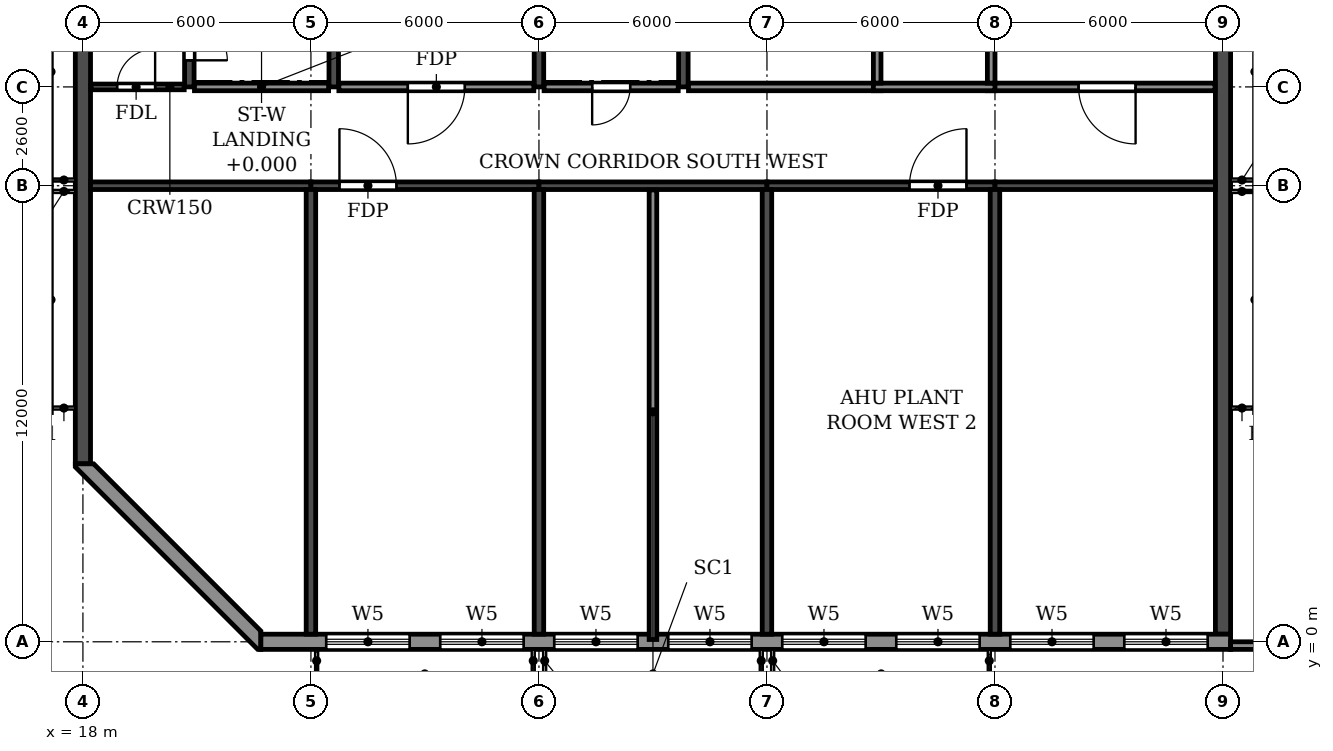
"""IFC4 building model, lengths in metres.
Left out: names, types, materials, properties, quantities, classifications, styles, units other than length and angle.
Written with IfcOpenShell. Run it as: python <this file> out.ifc"""

import sys

from ifc_helpers import new_model, si_unit, direction, frame, frame_2d, origin, place, context, subcontext, project, spatial, polyline, rectangle, outline, extrude, element, fill, save


model = new_model("IFC4")
c1 = context("Model", 3, precision=1e-05, world=origin(), true_north=direction((0.0, 1.0)))
c2 = subcontext(c1, "Body", "Model", "MODEL_VIEW")
j1 = project(units=[si_unit("LENGTHUNIT", "METRE"), si_unit("PLANEANGLEUNIT", "RADIAN")], contexts=[c1])
p1 = place(None, origin())
s1 = spatial("IfcSite", under=j1, at=p1, CompositionType="ELEMENT")
p2 = place(p1, origin())
s2 = spatial("IfcBuilding", under=s1, at=p2, CompositionType="ELEMENT")
p3 = place(p2, frame((0.0, 0.0, 272.4)))
s3 = spatial("IfcBuildingStorey", under=s2, at=p3, CompositionType="ELEMENT", Elevation=272.4)
for number, where, z_axis, x_axis in (
    (1, (24.0, 0.2, 0.0), (0.0, 0.0, 1.0), (0.0, 1.0, 0.0)),
    (2, (30.0, 0.2, 0.0), (0.0, 0.0, 1.0), (0.0, 1.0, 0.0)),
    (3, (36.0, 0.2, 0.0), (0.0, 0.0, 1.0), (0.0, 1.0, 0.0)),
    (4, (42.0, 0.2, 0.0), (0.0, 0.0, 1.0), (0.0, 1.0, 0.0)),
):
    element("IfcWall", number, at=place(p3, frame(where, z_axis=z_axis, x_axis=x_axis)), inside=s3, PredefinedType="SHEAR", context=c2, shape_type="SweptSolid", body=[
        extrude(rectangle(XDim=11.7, YDim=0.25, at=frame_2d((5.85, 0.0))), origin(), (0.0, 0.0, 1.0), 3.05),
    ])
p4 = place(p3, frame((18.0, 4.683, 0.0), z_axis=(0.0, 0.0, 1.0), x_axis=(0.0, 1.0, 0.0)))
e5 = element("IfcWall", 5, at=p4, inside=s3, PredefinedType="SHEAR", context=c2, shape_type="SweptSolid", body=[
    extrude(rectangle(XDim=31.834, YDim=0.4, at=frame_2d((15.917, 0.0))), origin(), (0.0, 0.0, 1.0), 3.05),
])
p5 = place(p3, frame((48.0, 0.2, 0.0), z_axis=(0.0, 0.0, 1.0), x_axis=(0.0, 1.0, 0.0)))
e6 = element("IfcWall", 6, at=p5, inside=s3, PredefinedType="SHEAR", context=c2, shape_type="SweptSolid", body=[
    extrude(rectangle(XDim=40.8, YDim=0.4, at=frame_2d((20.4, 0.0))), origin(), (0.0, 0.0, 1.0), 3.05),
])
p6 = place(p3, frame((18.2, 12.0, 0.0), z_axis=(0.0, 0.0, 1.0), x_axis=(1.0, 0.0, 0.0)))
e7 = element("IfcWall", 7, at=p6, inside=s3, PredefinedType="SHEAR", context=c2, shape_type="SweptSolid", body=[
    extrude(rectangle(XDim=5.8, YDim=0.2, at=frame_2d((2.9, 0.0))), origin(), (0.0, 0.0, 1.0), 2.45),
])
p7 = place(p3, frame((24.0, 12.0, 0.0), z_axis=(0.0, 0.0, 1.0), x_axis=(1.0, 0.0, 0.0)))
e8 = element("IfcWall", 8, at=p7, inside=s3, PredefinedType="SHEAR", context=c2, shape_type="SweptSolid", body=[
    extrude(rectangle(XDim=6.0, YDim=0.2, at=frame_2d((3.0, 0.0))), origin(), (0.0, 0.0, 1.0), 2.45),
])
p8 = place(p7, frame((0.75, 0.0, 0.0)))
e9 = element("IfcOpeningElement", 9, at=p8, cuts=e8, PredefinedType="OPENING", context=c2, shape_type="SweptSolid", body=[
    extrude(rectangle(XDim=1.5, YDim=2.1, at=frame_2d((0.75, 1.05))), frame((0.0, 0.11, 0.0), z_axis=(0.0, -1.0, 0.0), x_axis=(1.0, 0.0, 0.0)), (0.0, 0.0, 1.0), 0.22),
])
p9 = place(p3, frame((30.0, 12.0, 0.0), z_axis=(0.0, 0.0, 1.0), x_axis=(1.0, 0.0, 0.0)))
e10 = element("IfcWall", 10, at=p9, inside=s3, PredefinedType="SHEAR", context=c2, shape_type="SweptSolid", body=[
    extrude(rectangle(XDim=6.0, YDim=0.2, at=frame_2d((3.0, 0.0))), origin(), (0.0, 0.0, 1.0), 2.45),
])
p10 = place(p3, frame((36.0, 12.0, 0.0), z_axis=(0.0, 0.0, 1.0), x_axis=(1.0, 0.0, 0.0)))
e11 = element("IfcWall", 11, at=p10, inside=s3, PredefinedType="SHEAR", context=c2, shape_type="SweptSolid", body=[
    extrude(rectangle(XDim=6.0, YDim=0.2, at=frame_2d((3.0, 0.0))), origin(), (0.0, 0.0, 1.0), 2.45),
])
p11 = place(p10, frame((3.75, 0.0, 0.0)))
e12 = element("IfcOpeningElement", 12, at=p11, cuts=e11, PredefinedType="OPENING", context=c2, shape_type="SweptSolid", body=[
    extrude(rectangle(XDim=1.5, YDim=2.1, at=frame_2d((0.75, 1.05))), frame((0.0, 0.11, 0.0), z_axis=(0.0, -1.0, 0.0), x_axis=(1.0, 0.0, 0.0)), (0.0, 0.0, 1.0), 0.22),
])
p12 = place(p3, frame((42.0, 12.0, 0.0), z_axis=(0.0, 0.0, 1.0), x_axis=(1.0, 0.0, 0.0)))
e13 = element("IfcWall", 13, at=p12, inside=s3, PredefinedType="SHEAR", context=c2, shape_type="SweptSolid", body=[
    extrude(rectangle(XDim=5.8, YDim=0.2, at=frame_2d((2.9, 0.0))), origin(), (0.0, 0.0, 1.0), 2.45),
])
p13 = place(p3, frame((20.8, 14.6, 0.0), z_axis=(0.0, 0.0, 1.0), x_axis=(0.0, 1.0, 0.0)))
e14 = element("IfcWall", 14, at=p13, inside=s3, PredefinedType="SOLIDWALL", context=c2, shape_type="SweptSolid", body=[
    extrude(rectangle(XDim=7.875, YDim=0.25, at=frame_2d((3.938, 0.0))), origin(), (0.0, 0.0, 1.0), 3.05),
])
p14 = place(p13, frame((0.7, 0.0, 0.0)))
e15 = element("IfcOpeningElement", 15, at=p14, cuts=e14, PredefinedType="OPENING", context=c2, shape_type="SweptSolid", body=[
    extrude(rectangle(XDim=1.0, YDim=2.1, at=frame_2d((0.5, 1.05))), frame((0.0, 0.135, 0.0), z_axis=(0.0, -1.0, 0.0), x_axis=(1.0, 0.0, 0.0)), (0.0, 0.0, 1.0), 0.27),
])
for number, where, z_axis, x_axis in (
    (16, (24.6, 14.6, 0.0), (0.0, 0.0, 1.0), (0.0, 1.0, 0.0)),
    (17, (30.0, 14.6, 0.0), (0.0, 0.0, 1.0), (0.0, 1.0, 0.0)),
    (18, (33.8, 14.6, 0.0), (0.0, 0.0, 1.0), (0.0, 1.0, 0.0)),
):
    element("IfcWall", number, at=place(p3, frame(where, z_axis=z_axis, x_axis=x_axis)), inside=s3, PredefinedType="SOLIDWALL", context=c2, shape_type="SweptSolid", body=[
        extrude(rectangle(XDim=7.875, YDim=0.25, at=frame_2d((3.938, 0.0))), origin(), (0.0, 0.0, 1.0), 3.05),
    ])
p15 = place(p3, frame((22.683, 0.0, 0.0), z_axis=(0.0, 0.0, 1.0), x_axis=(1.0, 0.0, 0.0)))
e19 = element("IfcWall", 19, at=p15, inside=s3, PredefinedType="STANDARD", context=c2, shape_type="SweptSolid", body=[
    extrude(rectangle(XDim=25.517, YDim=0.4, at=frame_2d((12.759, 0.0))), origin(), (0.0, 0.0, 1.0), 3.05),
])
p16 = place(p15, frame((1.717, 0.0, 0.6)))
e20 = element("IfcOpeningElement", 20, at=p16, cuts=e19, PredefinedType="OPENING", context=c2, shape_type="SweptSolid", body=[
    extrude(rectangle(XDim=2.2, YDim=2.4, at=frame_2d((1.1, 1.2))), frame((0.0, 0.21, 0.0), z_axis=(0.0, -1.0, 0.0), x_axis=(1.0, 0.0, 0.0)), (0.0, 0.0, 1.0), 0.42),
])
p17 = place(p15, frame((4.717, 0.0, 0.6)))
e21 = element("IfcOpeningElement", 21, at=p17, cuts=e19, PredefinedType="OPENING", context=c2, shape_type="SweptSolid", body=[
    extrude(rectangle(XDim=2.2, YDim=2.4, at=frame_2d((1.1, 1.2))), frame((0.0, 0.21, 0.0), z_axis=(0.0, -1.0, 0.0), x_axis=(1.0, 0.0, 0.0)), (0.0, 0.0, 1.0), 0.42),
])
p18 = place(p15, frame((7.717, 0.0, 0.6)))
e22 = element("IfcOpeningElement", 22, at=p18, cuts=e19, PredefinedType="OPENING", context=c2, shape_type="SweptSolid", body=[
    extrude(rectangle(XDim=2.2, YDim=2.4, at=frame_2d((1.1, 1.2))), frame((0.0, 0.21, 0.0), z_axis=(0.0, -1.0, 0.0), x_axis=(1.0, 0.0, 0.0)), (0.0, 0.0, 1.0), 0.42),
])
p19 = place(p15, frame((10.717, 0.0, 0.6)))
e23 = element("IfcOpeningElement", 23, at=p19, cuts=e19, PredefinedType="OPENING", context=c2, shape_type="SweptSolid", body=[
    extrude(rectangle(XDim=2.2, YDim=2.4, at=frame_2d((1.1, 1.2))), frame((0.0, 0.21, 0.0), z_axis=(0.0, -1.0, 0.0), x_axis=(1.0, 0.0, 0.0)), (0.0, 0.0, 1.0), 0.42),
])
p20 = place(p15, frame((13.717, 0.0, 0.6)))
e24 = element("IfcOpeningElement", 24, at=p20, cuts=e19, PredefinedType="OPENING", context=c2, shape_type="SweptSolid", body=[
    extrude(rectangle(XDim=2.2, YDim=2.4, at=frame_2d((1.1, 1.2))), frame((0.0, 0.21, 0.0), z_axis=(0.0, -1.0, 0.0), x_axis=(1.0, 0.0, 0.0)), (0.0, 0.0, 1.0), 0.42),
])
p21 = place(p15, frame((16.717, 0.0, 0.6)))
e25 = element("IfcOpeningElement", 25, at=p21, cuts=e19, PredefinedType="OPENING", context=c2, shape_type="SweptSolid", body=[
    extrude(rectangle(XDim=2.2, YDim=2.4, at=frame_2d((1.1, 1.2))), frame((0.0, 0.21, 0.0), z_axis=(0.0, -1.0, 0.0), x_axis=(1.0, 0.0, 0.0)), (0.0, 0.0, 1.0), 0.42),
])
p22 = place(p15, frame((19.717, 0.0, 0.6)))
e26 = element("IfcOpeningElement", 26, at=p22, cuts=e19, PredefinedType="OPENING", context=c2, shape_type="SweptSolid", body=[
    extrude(rectangle(XDim=2.2, YDim=2.4, at=frame_2d((1.1, 1.2))), frame((0.0, 0.21, 0.0), z_axis=(0.0, -1.0, 0.0), x_axis=(1.0, 0.0, 0.0)), (0.0, 0.0, 1.0), 0.42),
])
p23 = place(p15, frame((22.717, 0.0, 0.6)))
e27 = element("IfcOpeningElement", 27, at=p23, cuts=e19, PredefinedType="OPENING", context=c2, shape_type="SweptSolid", body=[
    extrude(rectangle(XDim=2.2, YDim=2.4, at=frame_2d((1.1, 1.2))), frame((0.0, 0.21, 0.0), z_axis=(0.0, -1.0, 0.0), x_axis=(1.0, 0.0, 0.0)), (0.0, 0.0, 1.0), 0.42),
])
p24 = place(p3, origin())
e28 = element("IfcWall", 28, at=p24, inside=s3, PredefinedType="STANDARD", context=c2, shape_type="SweptSolid", body=[
    extrude(outline(polyline([(17.8, 4.683), (17.8, 4.6), (22.6, -0.2), (22.683, -0.2), (22.683, 0.283), (18.283, 4.683), (17.8, 4.683)])), origin(), (0.0, 0.0, 1.0), 3.05),
])
p25 = place(p3, origin())
e29 = element("IfcWall", 29, at=p25, inside=s3, PredefinedType="PARAPET", context=c2, shape_type="SweptSolid", body=[
    extrude(outline(polyline([(53.8, -0.2), (53.8, 0.0), (48.22, 0.0), (48.2, 0.0), (48.2, -0.2), (48.22, -0.2), (53.8, -0.2)])), origin(), (0.0, 0.0, 1.0), 1.1),
])
p26 = place(p3, frame((18.21, 14.6, 0.0), z_axis=(0.0, 0.0, 1.0), x_axis=(1.0, 0.0, 0.0)))
e30 = element("IfcWall", 30, at=p26, inside=s3, PredefinedType="PARTITIONING", context=c2, shape_type="SweptSolid", body=[
    extrude(rectangle(XDim=2.455, YDim=0.15, at=frame_2d((1.228, 0.0))), origin(), (0.0, 0.0, 1.0), 3.05),
])
p27 = place(p26, frame((0.69, 0.0, 0.0)))
e31 = element("IfcOpeningElement", 31, at=p27, cuts=e30, PredefinedType="OPENING", context=c2, shape_type="SweptSolid", body=[
    extrude(rectangle(XDim=1.0, YDim=2.1, at=frame_2d((0.5, 1.05))), frame((0.0, 0.085, 0.0), z_axis=(0.0, -1.0, 0.0), x_axis=(1.0, 0.0, 0.0)), (0.0, 0.0, 1.0), 0.17),
])
p28 = place(p3, frame((24.735, 14.6, 0.0), z_axis=(0.0, 0.0, 1.0), x_axis=(1.0, 0.0, 0.0)))
e32 = element("IfcWall", 32, at=p28, inside=s3, PredefinedType="PARTITIONING", context=c2, shape_type="SweptSolid", body=[
    extrude(rectangle(XDim=5.13, YDim=0.2, at=frame_2d((2.565, 0.0))), origin(), (0.0, 0.0, 1.0), 3.05),
])
p29 = place(p28, frame((1.815, 0.0, 0.0)))
e33 = element("IfcOpeningElement", 33, at=p29, cuts=e32, PredefinedType="OPENING", context=c2, shape_type="SweptSolid", body=[
    extrude(rectangle(XDim=1.5, YDim=2.1, at=frame_2d((0.75, 1.05))), frame((0.0, 0.11, 0.0), z_axis=(0.0, -1.0, 0.0), x_axis=(1.0, 0.0, 0.0)), (0.0, 0.0, 1.0), 0.22),
])
p30 = place(p3, frame((33.935, 14.6, 0.0), z_axis=(0.0, 0.0, 1.0), x_axis=(1.0, 0.0, 0.0)))
e34 = element("IfcWall", 34, at=p30, inside=s3, PredefinedType="PARTITIONING", context=c2, shape_type="SweptSolid", body=[
    extrude(rectangle(XDim=5.065, YDim=0.2, at=frame_2d((2.532, 0.0))), origin(), (0.0, 0.0, 1.0), 3.05),
])
p31 = place(p3, frame((41.8, 14.6, 0.0), z_axis=(0.0, 0.0, 1.0), x_axis=(1.0, 0.0, 0.0)))
e35 = element("IfcWall", 35, at=p31, inside=s3, PredefinedType="PARTITIONING", context=c2, shape_type="SweptSolid", body=[
    extrude(rectangle(XDim=5.99, YDim=0.2, at=frame_2d((2.995, 0.0))), origin(), (0.0, 0.0, 1.0), 3.05),
])
p32 = place(p31, frame((2.4, 0.0, 0.0)))
e36 = element("IfcOpeningElement", 36, at=p32, cuts=e35, PredefinedType="OPENING", context=c2, shape_type="SweptSolid", body=[
    extrude(rectangle(XDim=1.5, YDim=2.1, at=frame_2d((0.75, 1.05))), frame((0.0, 0.11, 0.0), z_axis=(0.0, -1.0, 0.0), x_axis=(1.0, 0.0, 0.0)), (0.0, 0.0, 1.0), 0.22),
])
p33 = place(p3, frame((33.0, 0.06, 0.0), z_axis=(0.0, 0.0, 1.0), x_axis=(0.0, 1.0, 0.0)))
e37 = element("IfcWall", 37, at=p33, inside=s3, PredefinedType="PARTITIONING", context=c2, shape_type="SweptSolid", body=[
    extrude(rectangle(XDim=11.83, YDim=0.2, at=frame_2d((5.915, 0.0))), origin(), (0.0, 0.0, 1.0), 3.05),
])
p34 = place(p3, frame((38.8, 14.6, 0.0), z_axis=(0.0, 0.0, 1.0), x_axis=(1.0, 0.0, 0.0)))
e38 = element("IfcWall", 38, at=p34, inside=s3, PredefinedType="PARTITIONING", context=c2, shape_type="SweptSolid", body=[
    extrude(rectangle(XDim=3.2, YDim=0.2, at=frame_2d((1.6, 0.0))), origin(), (0.0, 0.0, 1.0), 3.05),
])
for number, where, z_axis, x_axis in (
    (39, (38.9, 14.7, 0.0), (0.0, 0.0, 1.0), (0.0, 1.0, 0.0)),
    (40, (41.9, 14.7, 0.0), (0.0, 0.0, 1.0), (0.0, 1.0, 0.0)),
):
    element("IfcWall", number, at=place(p3, frame(where, z_axis=z_axis, x_axis=x_axis)), inside=s3, PredefinedType="PARTITIONING", context=c2, shape_type="SweptSolid", body=[
        extrude(rectangle(XDim=4.2, YDim=0.2, at=frame_2d((2.1, 0.0))), origin(), (0.0, 0.0, 1.0), 3.05),
    ])
p35 = place(p3, frame((20.935, 14.6, 0.0), z_axis=(0.0, 0.0, 1.0), x_axis=(1.0, 0.0, 0.0)))
e41 = element("IfcWall", 41, at=p35, inside=s3, PredefinedType="PARTITIONING", context=c2, shape_type="SweptSolid", body=[
    extrude(rectangle(XDim=3.53, YDim=0.2, at=frame_2d((1.765, 0.0))), origin(), (0.0, 0.0, 1.0), 3.05),
])
p36 = place(p3, frame((30.135, 14.6, 0.0), z_axis=(0.0, 0.0, 1.0), x_axis=(1.0, 0.0, 0.0)))
e42 = element("IfcWall", 42, at=p36, inside=s3, PredefinedType="PARTITIONING", context=c2, shape_type="SweptSolid", body=[
    extrude(rectangle(XDim=3.53, YDim=0.2, at=frame_2d((1.765, 0.0))), origin(), (0.0, 0.0, 1.0), 3.05),
])
p37 = place(p36, frame((1.265, 0.0, 0.0)))
e43 = element("IfcOpeningElement", 43, at=p37, cuts=e42, PredefinedType="OPENING", context=c2, shape_type="SweptSolid", body=[
    extrude(rectangle(XDim=1.0, YDim=2.1, at=frame_2d((0.5, 1.05))), frame((0.0, 0.11, 0.0), z_axis=(0.0, -1.0, 0.0), x_axis=(1.0, 0.0, 0.0)), (0.0, 0.0, 1.0), 0.22),
])
p38 = place(p16, origin())
e44 = element("IfcWindow", 44, at=p38, inside=s3, PartitioningType="TRIPLE_PANEL_HORIZONTAL", PredefinedType="WINDOW", context=c2, shape_type="SweptSolid", body=[
    extrude(rectangle(XDim=2.2, YDim=2.4, at=frame_2d((1.1, 1.2))), frame((0.0, 0.03, 0.0), z_axis=(0.0, -1.0, 0.0), x_axis=(1.0, 0.0, 0.0)), (0.0, 0.0, 1.0), 0.06),
])
fill(e20, e44)
p39 = place(p17, origin())
e45 = element("IfcWindow", 45, at=p39, inside=s3, PartitioningType="TRIPLE_PANEL_HORIZONTAL", PredefinedType="WINDOW", context=c2, shape_type="SweptSolid", body=[
    extrude(rectangle(XDim=2.2, YDim=2.4, at=frame_2d((1.1, 1.2))), frame((0.0, 0.03, 0.0), z_axis=(0.0, -1.0, 0.0), x_axis=(1.0, 0.0, 0.0)), (0.0, 0.0, 1.0), 0.06),
])
fill(e21, e45)
p40 = place(p18, origin())
e46 = element("IfcWindow", 46, at=p40, inside=s3, PartitioningType="TRIPLE_PANEL_HORIZONTAL", PredefinedType="WINDOW", context=c2, shape_type="SweptSolid", body=[
    extrude(rectangle(XDim=2.2, YDim=2.4, at=frame_2d((1.1, 1.2))), frame((0.0, 0.03, 0.0), z_axis=(0.0, -1.0, 0.0), x_axis=(1.0, 0.0, 0.0)), (0.0, 0.0, 1.0), 0.06),
])
fill(e22, e46)
p41 = place(p19, origin())
e47 = element("IfcWindow", 47, at=p41, inside=s3, PartitioningType="TRIPLE_PANEL_HORIZONTAL", PredefinedType="WINDOW", context=c2, shape_type="SweptSolid", body=[
    extrude(rectangle(XDim=2.2, YDim=2.4, at=frame_2d((1.1, 1.2))), frame((0.0, 0.03, 0.0), z_axis=(0.0, -1.0, 0.0), x_axis=(1.0, 0.0, 0.0)), (0.0, 0.0, 1.0), 0.06),
])
fill(e23, e47)
p42 = place(p20, origin())
e48 = element("IfcWindow", 48, at=p42, inside=s3, PartitioningType="TRIPLE_PANEL_HORIZONTAL", PredefinedType="WINDOW", context=c2, shape_type="SweptSolid", body=[
    extrude(rectangle(XDim=2.2, YDim=2.4, at=frame_2d((1.1, 1.2))), frame((0.0, 0.03, 0.0), z_axis=(0.0, -1.0, 0.0), x_axis=(1.0, 0.0, 0.0)), (0.0, 0.0, 1.0), 0.06),
])
fill(e24, e48)
p43 = place(p21, origin())
e49 = element("IfcWindow", 49, at=p43, inside=s3, PartitioningType="TRIPLE_PANEL_HORIZONTAL", PredefinedType="WINDOW", context=c2, shape_type="SweptSolid", body=[
    extrude(rectangle(XDim=2.2, YDim=2.4, at=frame_2d((1.1, 1.2))), frame((0.0, 0.03, 0.0), z_axis=(0.0, -1.0, 0.0), x_axis=(1.0, 0.0, 0.0)), (0.0, 0.0, 1.0), 0.06),
])
fill(e25, e49)
p44 = place(p22, origin())
e50 = element("IfcWindow", 50, at=p44, inside=s3, PartitioningType="TRIPLE_PANEL_HORIZONTAL", PredefinedType="WINDOW", context=c2, shape_type="SweptSolid", body=[
    extrude(rectangle(XDim=2.2, YDim=2.4, at=frame_2d((1.1, 1.2))), frame((0.0, 0.03, 0.0), z_axis=(0.0, -1.0, 0.0), x_axis=(1.0, 0.0, 0.0)), (0.0, 0.0, 1.0), 0.06),
])
fill(e26, e50)
p45 = place(p23, origin())
e51 = element("IfcWindow", 51, at=p45, inside=s3, PartitioningType="TRIPLE_PANEL_HORIZONTAL", PredefinedType="WINDOW", context=c2, shape_type="SweptSolid", body=[
    extrude(rectangle(XDim=2.2, YDim=2.4, at=frame_2d((1.1, 1.2))), frame((0.0, 0.03, 0.0), z_axis=(0.0, -1.0, 0.0), x_axis=(1.0, 0.0, 0.0)), (0.0, 0.0, 1.0), 0.06),
])
fill(e27, e51)
p46 = place(p8, origin())
e52 = element("IfcDoor", 52, at=p46, inside=s3, OperationType="DOUBLE_DOOR_SINGLE_SWING", PredefinedType="DOOR", context=c2, shape_type="SweptSolid", body=[
    extrude(rectangle(XDim=1.5, YDim=2.1, at=frame_2d((0.75, 1.05))), frame((0.0, 0.025, 0.0), z_axis=(0.0, -1.0, 0.0), x_axis=(1.0, 0.0, 0.0)), (0.0, 0.0, 1.0), 0.05),
])
fill(e9, e52)
p47 = place(p29, frame((1.5, 0.0, 0.0), z_axis=(0.0, 0.0, 1.0), x_axis=(-1.0, 0.0, 0.0)))
e53 = element("IfcDoor", 53, at=p47, inside=s3, OperationType="DOUBLE_DOOR_SINGLE_SWING", PredefinedType="DOOR", context=c2, shape_type="SweptSolid", body=[
    extrude(rectangle(XDim=1.5, YDim=2.1, at=frame_2d((0.75, 1.05))), frame((0.0, 0.025, 0.0), z_axis=(0.0, -1.0, 0.0), x_axis=(1.0, 0.0, 0.0)), (0.0, 0.0, 1.0), 0.05),
])
fill(e33, e53)
p48 = place(p11, origin())
e54 = element("IfcDoor", 54, at=p48, inside=s3, OperationType="DOUBLE_DOOR_SINGLE_SWING", PredefinedType="DOOR", context=c2, shape_type="SweptSolid", body=[
    extrude(rectangle(XDim=1.5, YDim=2.1, at=frame_2d((0.75, 1.05))), frame((0.0, 0.025, 0.0), z_axis=(0.0, -1.0, 0.0), x_axis=(1.0, 0.0, 0.0)), (0.0, 0.0, 1.0), 0.05),
])
fill(e12, e54)
p49 = place(p32, frame((1.5, 0.0, 0.0), z_axis=(0.0, 0.0, 1.0), x_axis=(-1.0, 0.0, 0.0)))
e55 = element("IfcDoor", 55, at=p49, inside=s3, OperationType="DOUBLE_DOOR_SINGLE_SWING", PredefinedType="DOOR", context=c2, shape_type="SweptSolid", body=[
    extrude(rectangle(XDim=1.5, YDim=2.1, at=frame_2d((0.75, 1.05))), frame((0.0, 0.025, 0.0), z_axis=(0.0, -1.0, 0.0), x_axis=(1.0, 0.0, 0.0)), (0.0, 0.0, 1.0), 0.05),
])
fill(e36, e55)
p50 = place(p27, origin())
e56 = element("IfcDoor", 56, at=p50, inside=s3, OperationType="SINGLE_SWING_RIGHT", PredefinedType="DOOR", context=c2, shape_type="SweptSolid", body=[
    extrude(rectangle(XDim=1.0, YDim=2.1, at=frame_2d((0.5, 1.05))), frame((0.0, 0.025, 0.0), z_axis=(0.0, -1.0, 0.0), x_axis=(1.0, 0.0, 0.0)), (0.0, 0.0, 1.0), 0.05),
])
fill(e31, e56)
p51 = place(p14, frame((1.0, 0.0, 0.0), z_axis=(0.0, 0.0, 1.0), x_axis=(-1.0, 0.0, 0.0)))
e57 = element("IfcDoor", 57, at=p51, inside=s3, OperationType="SINGLE_SWING_RIGHT", PredefinedType="DOOR", context=c2, shape_type="SweptSolid", body=[
    extrude(rectangle(XDim=1.0, YDim=2.1, at=frame_2d((0.5, 1.05))), frame((0.0, 0.025, 0.0), z_axis=(0.0, -1.0, 0.0), x_axis=(1.0, 0.0, 0.0)), (0.0, 0.0, 1.0), 0.05),
])
fill(e15, e57)
p52 = place(p37, frame((1.0, 0.0, 0.0), z_axis=(0.0, 0.0, 1.0), x_axis=(-1.0, 0.0, 0.0)))
e58 = element("IfcDoor", 58, at=p52, inside=s3, OperationType="SINGLE_SWING_RIGHT", PredefinedType="DOOR", context=c2, shape_type="SweptSolid", body=[
    extrude(rectangle(XDim=1.0, YDim=2.1, at=frame_2d((0.5, 1.05))), frame((0.0, 0.025, 0.0), z_axis=(0.0, -1.0, 0.0), x_axis=(1.0, 0.0, 0.0)), (0.0, 0.0, 1.0), 0.05),
])
fill(e43, e58)
save(model, sys.argv[1])
